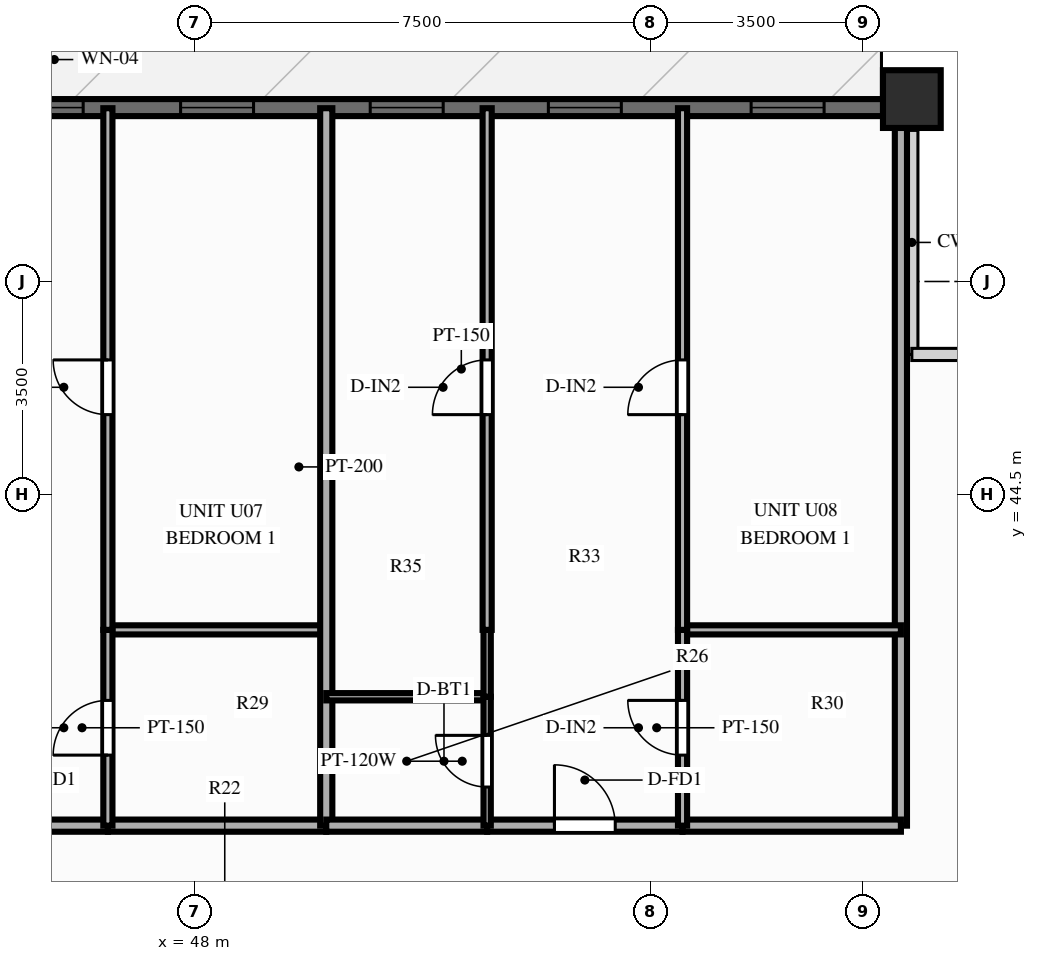
"""IFC4 building model, lengths in metres.
Left out: names, types, materials, properties, quantities, classifications, styles, units other than length and angle.
Written with IfcOpenShell. Run it as: python <this file> out.ifc"""

import sys

from ifc_helpers import new_model, si_unit, direction, frame, frame_2d, origin, origin_2d, place, context, subcontext, project, spatial, rectangle, extrude, source, transform, mapped, element, fill, save


model = new_model("IFC4")
c1 = context("Model", 3, precision=1e-05, world=origin(), true_north=direction((0.0, 1.0)))
c2 = subcontext(c1, "Body", "Model", "MODEL_VIEW")
j1 = project(units=[si_unit("LENGTHUNIT", "METRE"), si_unit("PLANEANGLEUNIT", "RADIAN")], contexts=[c1])
p1 = place(None, origin())
s1 = spatial("IfcSite", under=j1, at=p1, CompositionType="ELEMENT")
p2 = place(p1, origin())
s2 = spatial("IfcBuilding", under=s1, at=p2, CompositionType="ELEMENT")
p3 = place(p2, frame((0.0, 0.0, 89.85)))
s3 = spatial("IfcBuildingStorey", under=s2, at=p3, CompositionType="ELEMENT", Elevation=89.85)
m1 = source(origin(), c2, "Body", "SweptSolid", [
    extrude(rectangle(XDim=0.95, YDim=0.95, at=origin_2d()), origin(), (0.0, 0.0, 1.0), 3.0),
])
p4 = place(p3, frame((59.8, 51.0, 0.0), z_axis=(0.0, 0.0, 1.0), x_axis=(1.0, 0.0, 0.0)))
e1 = element("IfcColumn", 1, at=p4, inside=s3, PredefinedType="COLUMN", context=c2, shape_type="MappedRepresentation", body=[
    mapped(m1, transform((0.0, 0.0, 0.0), scale=1.0)),
])
p5 = place(p3, frame((16.2, 50.86, 0.0), z_axis=(0.0, 0.0, 1.0), x_axis=(1.0, 0.0, 0.0)))
e2 = element("IfcWall", 2, at=p5, inside=s3, PredefinedType="SOLIDWALL", context=c2, shape_type="SweptSolid", body=[
    extrude(rectangle(XDim=43.6, YDim=0.28, at=frame_2d((21.8, 0.0))), origin(), (0.0, 0.0, 1.0), 2.28),
])
p6 = place(p5, frame((0.722, 0.0, 0.25)))
e3 = element("IfcOpeningElement", 3, at=p6, cuts=e2, PredefinedType="OPENING", context=c2, shape_type="SweptSolid", body=[
    extrude(rectangle(XDim=1.2, YDim=1.5, at=frame_2d((0.6, 0.75))), frame((0.0, 0.152, 0.0), z_axis=(0.0, -1.0, 0.0), x_axis=(1.0, 0.0, 0.0)), (0.0, 0.0, 1.0), 0.304),
])
p7 = place(p5, frame((3.172, 0.0, 0.25)))
e4 = element("IfcOpeningElement", 4, at=p7, cuts=e2, PredefinedType="OPENING", context=c2, shape_type="SweptSolid", body=[
    extrude(rectangle(XDim=1.2, YDim=1.5, at=frame_2d((0.6, 0.75))), frame((0.0, 0.152, 0.0), z_axis=(0.0, -1.0, 0.0), x_axis=(1.0, 0.0, 0.0)), (0.0, 0.0, 1.0), 0.304),
])
p8 = place(p5, frame((6.944, 0.0, 0.25)))
e5 = element("IfcOpeningElement", 5, at=p8, cuts=e2, PredefinedType="OPENING", context=c2, shape_type="SweptSolid", body=[
    extrude(rectangle(XDim=1.2, YDim=1.5, at=frame_2d((0.6, 0.75))), frame((0.0, 0.152, 0.0), z_axis=(0.0, -1.0, 0.0), x_axis=(1.0, 0.0, 0.0)), (0.0, 0.0, 1.0), 0.304),
])
p9 = place(p5, frame((11.049, 0.0, 0.25)))
e6 = element("IfcOpeningElement", 6, at=p9, cuts=e2, PredefinedType="OPENING", context=c2, shape_type="SweptSolid", body=[
    extrude(rectangle(XDim=1.2, YDim=1.5, at=frame_2d((0.6, 0.75))), frame((0.0, 0.152, 0.0), z_axis=(0.0, -1.0, 0.0), x_axis=(1.0, 0.0, 0.0)), (0.0, 0.0, 1.0), 0.304),
])
p10 = place(p5, frame((13.73, 0.0, 0.25)))
e7 = element("IfcOpeningElement", 7, at=p10, cuts=e2, PredefinedType="OPENING", context=c2, shape_type="SweptSolid", body=[
    extrude(rectangle(XDim=0.95, YDim=1.5, at=frame_2d((0.475, 0.75))), frame((0.0, 0.152, 0.0), z_axis=(0.0, -1.0, 0.0), x_axis=(1.0, 0.0, 0.0)), (0.0, 0.0, 1.0), 0.304),
])
p11 = place(p5, frame((18.089, 0.0, 0.0)))
e8 = element("IfcOpeningElement", 8, at=p11, cuts=e2, PredefinedType="OPENING", context=c2, shape_type="SweptSolid", body=[
    extrude(rectangle(XDim=1.1, YDim=2.15, at=frame_2d((0.55, 1.075))), frame((0.0, 0.152, 0.0), z_axis=(0.0, -1.0, 0.0), x_axis=(1.0, 0.0, 0.0)), (0.0, 0.0, 1.0), 0.304),
])
p12 = place(p5, frame((22.144, 0.0, 0.25)))
e9 = element("IfcOpeningElement", 9, at=p12, cuts=e2, PredefinedType="OPENING", context=c2, shape_type="SweptSolid", body=[
    extrude(rectangle(XDim=1.2, YDim=1.5, at=frame_2d((0.6, 0.75))), frame((0.0, 0.152, 0.0), z_axis=(0.0, -1.0, 0.0), x_axis=(1.0, 0.0, 0.0)), (0.0, 0.0, 1.0), 0.304),
])
p13 = place(p5, frame((25.242, 0.0, 0.25)))
e10 = element("IfcOpeningElement", 10, at=p13, cuts=e2, PredefinedType="OPENING", context=c2, shape_type="SweptSolid", body=[
    extrude(rectangle(XDim=1.2, YDim=1.5, at=frame_2d((0.6, 0.75))), frame((0.0, 0.152, 0.0), z_axis=(0.0, -1.0, 0.0), x_axis=(1.0, 0.0, 0.0)), (0.0, 0.0, 1.0), 0.304),
])
p14 = place(p5, frame((29.021, 0.0, 0.25)))
e11 = element("IfcOpeningElement", 11, at=p14, cuts=e2, PredefinedType="OPENING", context=c2, shape_type="SweptSolid", body=[
    extrude(rectangle(XDim=0.95, YDim=1.5, at=frame_2d((0.475, 0.75))), frame((0.0, 0.152, 0.0), z_axis=(0.0, -1.0, 0.0), x_axis=(1.0, 0.0, 0.0)), (0.0, 0.0, 1.0), 0.304),
])
p15 = place(p5, frame((31.574, 0.0, 0.25)))
e12 = element("IfcOpeningElement", 12, at=p15, cuts=e2, PredefinedType="OPENING", context=c2, shape_type="SweptSolid", body=[
    extrude(rectangle(XDim=1.2, YDim=1.5, at=frame_2d((0.6, 0.75))), frame((0.0, 0.152, 0.0), z_axis=(0.0, -1.0, 0.0), x_axis=(1.0, 0.0, 0.0)), (0.0, 0.0, 1.0), 0.304),
])
p16 = place(p5, frame((34.692, 0.0, 0.25)))
e13 = element("IfcOpeningElement", 13, at=p16, cuts=e2, PredefinedType="OPENING", context=c2, shape_type="SweptSolid", body=[
    extrude(rectangle(XDim=1.2, YDim=1.5, at=frame_2d((0.6, 0.75))), frame((0.0, 0.152, 0.0), z_axis=(0.0, -1.0, 0.0), x_axis=(1.0, 0.0, 0.0)), (0.0, 0.0, 1.0), 0.304),
])
p17 = place(p5, frame((37.622, 0.0, 0.25)))
e14 = element("IfcOpeningElement", 14, at=p17, cuts=e2, PredefinedType="OPENING", context=c2, shape_type="SweptSolid", body=[
    extrude(rectangle(XDim=1.2, YDim=1.5, at=frame_2d((0.6, 0.75))), frame((0.0, 0.152, 0.0), z_axis=(0.0, -1.0, 0.0), x_axis=(1.0, 0.0, 0.0)), (0.0, 0.0, 1.0), 0.304),
])
p18 = place(p5, frame((40.957, 0.0, 0.25)))
e15 = element("IfcOpeningElement", 15, at=p18, cuts=e2, PredefinedType="OPENING", context=c2, shape_type="SweptSolid", body=[
    extrude(rectangle(XDim=1.2, YDim=1.5, at=frame_2d((0.6, 0.75))), frame((0.0, 0.152, 0.0), z_axis=(0.0, -1.0, 0.0), x_axis=(1.0, 0.0, 0.0)), (0.0, 0.0, 1.0), 0.304),
])
p19 = place(p3, frame((59.62, 39.05, 0.0), z_axis=(0.0, 0.0, 1.0), x_axis=(0.0, 1.0, 0.0)))
e16 = element("IfcWall", 16, at=p19, inside=s3, PredefinedType="PARTITIONING", context=c2, shape_type="SweptSolid", body=[
    extrude(rectangle(XDim=11.8, YDim=0.2, at=frame_2d((5.9, 0.0))), origin(), (0.0, 0.0, 1.0), 2.79),
])
p20 = place(p3, frame((43.365, 39.05, 0.0), z_axis=(0.0, 0.0, 1.0), x_axis=(1.0, 0.0, 0.0)))
e17 = element("IfcWall", 17, at=p20, inside=s3, PredefinedType="PARTITIONING", context=c2, shape_type="SweptSolid", body=[
    extrude(rectangle(XDim=3.213, YDim=0.2, at=frame_2d((1.606, 0.0))), origin(), (0.0, 0.0, 1.0), 2.79),
])
p21 = place(p20, frame((0.26, 0.0, 0.0)))
e18 = element("IfcOpeningElement", 18, at=p21, cuts=e17, PredefinedType="OPENING", context=c2, shape_type="SweptSolid", body=[
    extrude(rectangle(XDim=1.0, YDim=2.15, at=frame_2d((0.5, 1.075))), frame((0.0, 0.112, 0.0), z_axis=(0.0, -1.0, 0.0), x_axis=(1.0, 0.0, 0.0)), (0.0, 0.0, 1.0), 0.224),
])
p22 = place(p3, frame((46.578, 39.05, 0.0), z_axis=(0.0, 0.0, 1.0), x_axis=(1.0, 0.0, 0.0)))
e19 = element("IfcWall", 19, at=p22, inside=s3, PredefinedType="PARTITIONING", context=c2, shape_type="SweptSolid", body=[
    extrude(rectangle(XDim=3.591, YDim=0.2, at=frame_2d((1.796, 0.0))), origin(), (0.0, 0.0, 1.0), 2.79),
])
p23 = place(p3, frame((46.578, 42.27, 0.0), z_axis=(0.0, 0.0, 1.0), x_axis=(1.0, 0.0, 0.0)))
e20 = element("IfcWall", 20, at=p23, inside=s3, PredefinedType="PARTITIONING", context=c2, shape_type="SweptSolid", body=[
    extrude(rectangle(XDim=3.591, YDim=0.15, at=frame_2d((1.796, 0.0))), origin(), (0.0, 0.0, 1.0), 2.79),
])
p24 = place(p3, frame((46.578, 39.05, 0.0), z_axis=(0.0, 0.0, 1.0), x_axis=(0.0, 1.0, 0.0)))
e21 = element("IfcWall", 21, at=p24, inside=s3, PredefinedType="PARTITIONING", context=c2, shape_type="SweptSolid", body=[
    extrude(rectangle(XDim=3.22, YDim=0.15, at=frame_2d((1.61, 0.0))), origin(), (0.0, 0.0, 1.0), 2.79),
])
p25 = place(p24, frame((1.16, 0.0, 0.0)))
e22 = element("IfcOpeningElement", 22, at=p25, cuts=e21, PredefinedType="OPENING", context=c2, shape_type="SweptSolid", body=[
    extrude(rectangle(XDim=0.9, YDim=2.1, at=frame_2d((0.45, 1.05))), frame((0.0, 0.087, 0.0), z_axis=(0.0, -1.0, 0.0), x_axis=(1.0, 0.0, 0.0)), (0.0, 0.0, 1.0), 0.174),
])
p26 = place(p3, frame((46.578, 42.27, 0.0), z_axis=(0.0, 0.0, 1.0), x_axis=(0.0, 1.0, 0.0)))
e23 = element("IfcWall", 23, at=p26, inside=s3, PredefinedType="PARTITIONING", context=c2, shape_type="SweptSolid", body=[
    extrude(rectangle(XDim=8.58, YDim=0.15, at=frame_2d((4.29, 0.0))), origin(), (0.0, 0.0, 1.0), 2.79),
])
p27 = place(p26, frame((3.54, 0.0, 0.0)))
e24 = element("IfcOpeningElement", 24, at=p27, cuts=e23, PredefinedType="OPENING", context=c2, shape_type="SweptSolid", body=[
    extrude(rectangle(XDim=0.9, YDim=2.1, at=frame_2d((0.45, 1.05))), frame((0.0, 0.087, 0.0), z_axis=(0.0, -1.0, 0.0), x_axis=(1.0, 0.0, 0.0)), (0.0, 0.0, 1.0), 0.174),
])
p28 = place(p3, frame((50.169, 39.05, 0.0), z_axis=(0.0, 0.0, 1.0), x_axis=(0.0, 1.0, 0.0)))
e25 = element("IfcWall", 25, at=p28, inside=s3, PredefinedType="PARTITIONING", context=c2, shape_type="SweptSolid", body=[
    extrude(rectangle(XDim=11.8, YDim=0.2, at=frame_2d((5.9, 0.0))), origin(), (0.0, 0.0, 1.0), 2.79),
])
p29 = place(p3, frame((50.169, 39.05, 0.0), z_axis=(0.0, 0.0, 1.0), x_axis=(1.0, 0.0, 0.0)))
e26 = element("IfcWall", 26, at=p29, inside=s3, PredefinedType="PARTITIONING", context=c2, shape_type="SweptSolid", body=[
    extrude(rectangle(XDim=2.646, YDim=0.2, at=frame_2d((1.323, 0.0))), origin(), (0.0, 0.0, 1.0), 2.79),
])
p30 = place(p3, frame((52.815, 39.05, 0.0), z_axis=(0.0, 0.0, 1.0), x_axis=(1.0, 0.0, 0.0)))
e27 = element("IfcWall", 27, at=p30, inside=s3, PredefinedType="PARTITIONING", context=c2, shape_type="SweptSolid", body=[
    extrude(rectangle(XDim=3.213, YDim=0.2, at=frame_2d((1.607, 0.0))), origin(), (0.0, 0.0, 1.0), 2.79),
])
p31 = place(p30, frame((1.107, 0.0, 0.0)))
e28 = element("IfcOpeningElement", 28, at=p31, cuts=e27, PredefinedType="OPENING", context=c2, shape_type="SweptSolid", body=[
    extrude(rectangle(XDim=1.0, YDim=2.15, at=frame_2d((0.5, 1.075))), frame((0.0, 0.112, 0.0), z_axis=(0.0, -1.0, 0.0), x_axis=(1.0, 0.0, 0.0)), (0.0, 0.0, 1.0), 0.224),
])
p32 = place(p3, frame((56.029, 39.05, 0.0), z_axis=(0.0, 0.0, 1.0), x_axis=(1.0, 0.0, 0.0)))
e29 = element("IfcWall", 29, at=p32, inside=s3, PredefinedType="PARTITIONING", context=c2, shape_type="SweptSolid", body=[
    extrude(rectangle(XDim=3.591, YDim=0.2, at=frame_2d((1.796, 0.0))), origin(), (0.0, 0.0, 1.0), 2.79),
])
p33 = place(p3, frame((50.169, 41.17, 0.0), z_axis=(0.0, 0.0, 1.0), x_axis=(1.0, 0.0, 0.0)))
e30 = element("IfcWall", 30, at=p33, inside=s3, PredefinedType="PARTITIONING", context=c2, shape_type="SweptSolid", body=[
    extrude(rectangle(XDim=2.646, YDim=0.12, at=frame_2d((1.323, 0.0))), origin(), (0.0, 0.0, 1.0), 2.79),
])
p34 = place(p3, frame((56.029, 42.27, 0.0), z_axis=(0.0, 0.0, 1.0), x_axis=(1.0, 0.0, 0.0)))
e31 = element("IfcWall", 31, at=p34, inside=s3, PredefinedType="PARTITIONING", context=c2, shape_type="SweptSolid", body=[
    extrude(rectangle(XDim=3.591, YDim=0.15, at=frame_2d((1.796, 0.0))), origin(), (0.0, 0.0, 1.0), 2.79),
])
p35 = place(p3, frame((52.815, 39.05, 0.0), z_axis=(0.0, 0.0, 1.0), x_axis=(0.0, 1.0, 0.0)))
e32 = element("IfcWall", 32, at=p35, inside=s3, PredefinedType="PARTITIONING", context=c2, shape_type="SweptSolid", body=[
    extrude(rectangle(XDim=2.12, YDim=0.12, at=frame_2d((1.06, 0.0))), origin(), (0.0, 0.0, 1.0), 2.79),
])
p36 = place(p35, frame((0.635, 0.0, 0.0)))
e33 = element("IfcOpeningElement", 33, at=p36, cuts=e32, PredefinedType="OPENING", context=c2, shape_type="SweptSolid", body=[
    extrude(rectangle(XDim=0.85, YDim=2.05, at=frame_2d((0.425, 1.025))), frame((0.0, 0.072, 0.0), z_axis=(0.0, -1.0, 0.0), x_axis=(1.0, 0.0, 0.0)), (0.0, 0.0, 1.0), 0.144),
])
p37 = place(p3, frame((52.815, 41.17, 0.0), z_axis=(0.0, 0.0, 1.0), x_axis=(0.0, 1.0, 0.0)))
e34 = element("IfcWall", 34, at=p37, inside=s3, PredefinedType="PARTITIONING", context=c2, shape_type="SweptSolid", body=[
    extrude(rectangle(XDim=1.1, YDim=0.12, at=frame_2d((0.55, 0.0))), origin(), (0.0, 0.0, 1.0), 2.79),
])
p38 = place(p3, frame((52.815, 42.27, 0.0), z_axis=(0.0, 0.0, 1.0), x_axis=(0.0, 1.0, 0.0)))
e35 = element("IfcWall", 35, at=p38, inside=s3, PredefinedType="PARTITIONING", context=c2, shape_type="SweptSolid", body=[
    extrude(rectangle(XDim=8.58, YDim=0.15, at=frame_2d((4.29, 0.0))), origin(), (0.0, 0.0, 1.0), 2.79),
])
p39 = place(p38, frame((3.54, 0.0, 0.0)))
e36 = element("IfcOpeningElement", 36, at=p39, cuts=e35, PredefinedType="OPENING", context=c2, shape_type="SweptSolid", body=[
    extrude(rectangle(XDim=0.9, YDim=2.1, at=frame_2d((0.45, 1.05))), frame((0.0, 0.087, 0.0), z_axis=(0.0, -1.0, 0.0), x_axis=(1.0, 0.0, 0.0)), (0.0, 0.0, 1.0), 0.174),
])
p40 = place(p3, frame((56.029, 39.05, 0.0), z_axis=(0.0, 0.0, 1.0), x_axis=(0.0, 1.0, 0.0)))
e37 = element("IfcWall", 37, at=p40, inside=s3, PredefinedType="PARTITIONING", context=c2, shape_type="SweptSolid", body=[
    extrude(rectangle(XDim=3.22, YDim=0.15, at=frame_2d((1.61, 0.0))), origin(), (0.0, 0.0, 1.0), 2.79),
])
p41 = place(p40, frame((1.16, 0.0, 0.0)))
e38 = element("IfcOpeningElement", 38, at=p41, cuts=e37, PredefinedType="OPENING", context=c2, shape_type="SweptSolid", body=[
    extrude(rectangle(XDim=0.9, YDim=2.1, at=frame_2d((0.45, 1.05))), frame((0.0, 0.087, 0.0), z_axis=(0.0, -1.0, 0.0), x_axis=(1.0, 0.0, 0.0)), (0.0, 0.0, 1.0), 0.174),
])
p42 = place(p3, frame((56.029, 42.27, 0.0), z_axis=(0.0, 0.0, 1.0), x_axis=(0.0, 1.0, 0.0)))
e39 = element("IfcWall", 39, at=p42, inside=s3, PredefinedType="PARTITIONING", context=c2, shape_type="SweptSolid", body=[
    extrude(rectangle(XDim=8.58, YDim=0.15, at=frame_2d((4.29, 0.0))), origin(), (0.0, 0.0, 1.0), 2.79),
])
p43 = place(p42, frame((3.54, 0.0, 0.0)))
e40 = element("IfcOpeningElement", 40, at=p43, cuts=e39, PredefinedType="OPENING", context=c2, shape_type="SweptSolid", body=[
    extrude(rectangle(XDim=0.9, YDim=2.1, at=frame_2d((0.45, 1.05))), frame((0.0, 0.087, 0.0), z_axis=(0.0, -1.0, 0.0), x_axis=(1.0, 0.0, 0.0)), (0.0, 0.0, 1.0), 0.174),
])
m2 = source(origin(), c2, "Body", "SweptSolid", [
    extrude(rectangle(XDim=0.95, YDim=1.5, at=frame_2d((0.475, 0.75))), frame((0.0, 0.03, 0.0), z_axis=(0.0, -1.0, 0.0), x_axis=(1.0, 0.0, 0.0)), (0.0, 0.0, 1.0), 0.06),
])
p44 = place(p14, origin())
e41 = element("IfcWindow", 41, at=p44, inside=s3, PartitioningType="SINGLE_PANEL", PredefinedType="WINDOW", context=c2, shape_type="MappedRepresentation", body=[
    mapped(m2, transform((0.0, 0.0, 0.0), scale=1.0)),
])
fill(e11, e41)
m3 = source(origin(), c2, "Body", "SweptSolid", [
    extrude(rectangle(XDim=1.2, YDim=1.5, at=frame_2d((0.6, 0.75))), frame((0.0, 0.03, 0.0), z_axis=(0.0, -1.0, 0.0), x_axis=(1.0, 0.0, 0.0)), (0.0, 0.0, 1.0), 0.06),
])
p45 = place(p15, origin())
e42 = element("IfcWindow", 42, at=p45, inside=s3, PartitioningType="SINGLE_PANEL", PredefinedType="WINDOW", context=c2, shape_type="MappedRepresentation", body=[
    mapped(m3, transform((0.0, 0.0, 0.0), scale=1.0)),
])
fill(e12, e42)
p46 = place(p16, origin())
e43 = element("IfcWindow", 43, at=p46, inside=s3, PartitioningType="SINGLE_PANEL", PredefinedType="WINDOW", context=c2, shape_type="MappedRepresentation", body=[
    mapped(m3, transform((0.0, 0.0, 0.0), scale=1.0)),
])
fill(e13, e43)
p47 = place(p17, origin())
e44 = element("IfcWindow", 44, at=p47, inside=s3, PartitioningType="SINGLE_PANEL", PredefinedType="WINDOW", context=c2, shape_type="MappedRepresentation", body=[
    mapped(m3, transform((0.0, 0.0, 0.0), scale=1.0)),
])
fill(e14, e44)
p48 = place(p18, origin())
e45 = element("IfcWindow", 45, at=p48, inside=s3, PartitioningType="SINGLE_PANEL", PredefinedType="WINDOW", context=c2, shape_type="MappedRepresentation", body=[
    mapped(m3, transform((0.0, 0.0, 0.0), scale=1.0)),
])
fill(e15, e45)
m4 = source(origin(), c2, "Body", "SweptSolid", [
    extrude(rectangle(XDim=0.9, YDim=2.1, at=frame_2d((0.45, 1.05))), frame((0.0, 0.025, 0.0), z_axis=(0.0, -1.0, 0.0), x_axis=(1.0, 0.0, 0.0)), (0.0, 0.0, 1.0), 0.05),
])
p49 = place(p25, origin())
e46 = element("IfcDoor", 46, at=p49, inside=s3, OperationType="SINGLE_SWING_LEFT", PredefinedType="DOOR", context=c2, shape_type="MappedRepresentation", body=[
    mapped(m4, transform((0.0, 0.0, 0.0), scale=1.0)),
])
fill(e22, e46)
p50 = place(p27, origin())
e47 = element("IfcDoor", 47, at=p50, inside=s3, OperationType="SINGLE_SWING_RIGHT", PredefinedType="DOOR", context=c2, shape_type="MappedRepresentation", body=[
    mapped(m4, transform((0.0, 0.0, 0.0), scale=1.0)),
])
fill(e24, e47)
m5 = source(origin(), c2, "Body", "SweptSolid", [
    extrude(rectangle(XDim=1.0, YDim=2.15, at=frame_2d((0.5, 1.075))), frame((0.0, 0.025, 0.0), z_axis=(0.0, -1.0, 0.0), x_axis=(1.0, 0.0, 0.0)), (0.0, 0.0, 1.0), 0.05),
])
p51 = place(p31, origin())
e48 = element("IfcDoor", 48, at=p51, inside=s3, OperationType="SINGLE_SWING_LEFT", PredefinedType="DOOR", context=c2, shape_type="MappedRepresentation", body=[
    mapped(m5, transform((0.0, 0.0, 0.0), scale=1.0)),
])
fill(e28, e48)
m6 = source(origin(), c2, "Body", "SweptSolid", [
    extrude(rectangle(XDim=0.85, YDim=2.05, at=frame_2d((0.425, 1.025))), frame((0.0, 0.025, 0.0), z_axis=(0.0, -1.0, 0.0), x_axis=(1.0, 0.0, 0.0)), (0.0, 0.0, 1.0), 0.05),
])
p52 = place(p36, origin())
e49 = element("IfcDoor", 49, at=p52, inside=s3, OperationType="SINGLE_SWING_RIGHT", PredefinedType="DOOR", context=c2, shape_type="MappedRepresentation", body=[
    mapped(m6, transform((0.0, 0.0, 0.0), scale=1.0)),
])
fill(e33, e49)
p53 = place(p39, origin())
e50 = element("IfcDoor", 50, at=p53, inside=s3, OperationType="SINGLE_SWING_LEFT", PredefinedType="DOOR", context=c2, shape_type="MappedRepresentation", body=[
    mapped(m4, transform((0.0, 0.0, 0.0), scale=1.0)),
])
fill(e36, e50)
p54 = place(p41, origin())
e51 = element("IfcDoor", 51, at=p54, inside=s3, OperationType="SINGLE_SWING_RIGHT", PredefinedType="DOOR", context=c2, shape_type="MappedRepresentation", body=[
    mapped(m4, transform((0.0, 0.0, 0.0), scale=1.0)),
])
fill(e38, e51)
p55 = place(p43, origin())
e52 = element("IfcDoor", 52, at=p55, inside=s3, OperationType="SINGLE_SWING_LEFT", PredefinedType="DOOR", context=c2, shape_type="MappedRepresentation", body=[
    mapped(m4, transform((0.0, 0.0, 0.0), scale=1.0)),
])
fill(e40, e52)
save(model, sys.argv[1])
